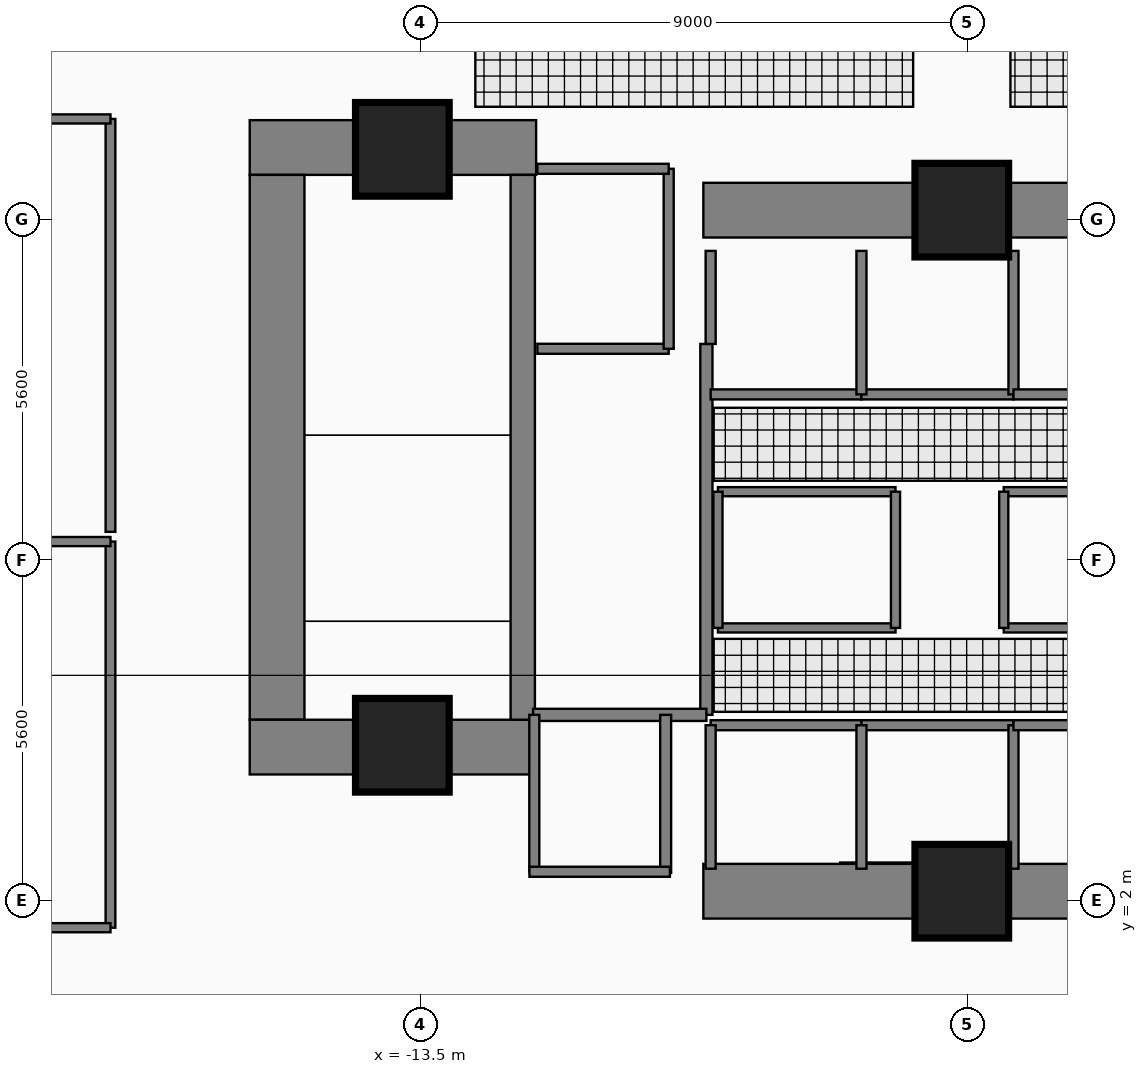
"""IFC4 building model, lengths in metres.
Left out: names, types, materials, properties, quantities, classifications, styles, units other than length and angle.
Written with IfcOpenShell. Run it as: python <this file> out.ifc"""

import sys

from ifc_helpers import new_model, si_unit, direction, frame, frame_2d, origin, origin_2d, place, context, subcontext, project, spatial, rectangle, extrude, element, fill, save


model = new_model("IFC4")
c1 = context("Model", 3, precision=1e-05, world=origin(), true_north=direction((0.0, 1.0)))
c2 = subcontext(c1, "Body", "Model", "MODEL_VIEW")
j1 = project(units=[si_unit("LENGTHUNIT", "METRE"), si_unit("PLANEANGLEUNIT", "RADIAN")], contexts=[c1])
p1 = place(None, origin())
s1 = spatial("IfcSite", under=j1, at=p1, CompositionType="ELEMENT")
p2 = place(p1, origin())
s2 = spatial("IfcBuilding", under=s1, at=p2, CompositionType="ELEMENT")
p3 = place(p2, frame((0.0, 0.0, 27.6)))
s3 = spatial("IfcBuildingStorey", under=s2, at=p3, CompositionType="ELEMENT", Elevation=27.6)
p4 = place(p3, frame((-16.31, 14.38, 0.0), z_axis=(0.0, 0.0, 1.0), x_axis=(1.0, 0.0, 0.0)))
e1 = element("IfcWall", 1, at=p4, inside=s3, PredefinedType="SHEAR", context=c2, shape_type="SweptSolid", body=[
    extrude(rectangle(XDim=4.71, YDim=0.9, at=frame_2d((2.355, 0.0))), origin(), (0.0, 0.0, 1.0), 3.46),
])
p5 = place(p3, frame((-15.86, 4.97, 0.0), z_axis=(0.0, 0.0, 1.0), x_axis=(0.0, 1.0, 0.0)))
e2 = element("IfcWall", 2, at=p5, inside=s3, PredefinedType="SHEAR", context=c2, shape_type="SweptSolid", body=[
    extrude(rectangle(XDim=8.96, YDim=0.9, at=frame_2d((4.48, 0.0))), origin(), (0.0, 0.0, 1.0), 3.46),
])
p6 = place(p3, frame((-16.31, 4.52, 0.0), z_axis=(0.0, 0.0, 1.0), x_axis=(1.0, 0.0, 0.0)))
e3 = element("IfcWall", 3, at=p6, inside=s3, PredefinedType="SHEAR", context=c2, shape_type="SweptSolid", body=[
    extrude(rectangle(XDim=4.71, YDim=0.9, at=frame_2d((2.355, 0.0))), origin(), (0.0, 0.0, 1.0), 3.46),
])
for number, where, z_axis, x_axis in (
    (4, (-8.85, 2.15, 0.0), (0.0, 0.0, 1.0), (1.0, 0.0, 0.0)),
    (5, (-8.85, 13.35, 0.0), (0.0, 0.0, 1.0), (1.0, 0.0, 0.0)),
):
    element("IfcWall", number, at=place(p3, frame(where, z_axis=z_axis, x_axis=x_axis)), inside=s3, PredefinedType="SHEAR", context=c2, shape_type="SweptSolid", body=[
        extrude(rectangle(XDim=7.6, YDim=0.9, at=frame_2d((3.8, 0.0))), origin(), (0.0, 0.0, 1.0), 3.43),
    ])
p7 = place(p3, frame((-11.82, 4.97, 0.0), z_axis=(0.0, 0.0, 1.0), x_axis=(0.0, 1.0, 0.0)))
e6 = element("IfcWall", 6, at=p7, inside=s3, PredefinedType="SHEAR", context=c2, shape_type="SweptSolid", body=[
    extrude(rectangle(XDim=8.96, YDim=0.4, at=frame_2d((4.48, 0.0))), origin(), (0.0, 0.0, 1.0), 3.46),
])
p8 = place(p7, frame((0.31, 0.0, 0.0)))
e7 = element("IfcOpeningElement", 7, at=p8, cuts=e6, PredefinedType="OPENING", context=c2, shape_type="SweptSolid", body=[
    extrude(rectangle(XDim=1.12, YDim=2.22, at=frame_2d((0.56, 1.11))), frame((0.0, 0.21, 0.0), z_axis=(0.0, -1.0, 0.0), x_axis=(1.0, 0.0, 0.0)), (0.0, 0.0, 1.0), 0.42),
])
for number, where, z_axis, x_axis in (
    (8, (-13.8, 14.35, 0.0), (0.0, 0.0, 1.0), (1.0, 0.0, 0.0)),
    (9, (-4.6, 13.35, 0.0), (0.0, 0.0, 1.0), (1.0, 0.0, 0.0)),
    (10, (-13.8, 4.55, 0.0), (0.0, 0.0, 1.0), (1.0, 0.0, 0.0)),
    (11, (-4.6, 2.15, 0.0), (0.0, 0.0, 1.0), (1.0, 0.0, 0.0)),
):
    element("IfcColumn", number, at=place(p3, frame(where, z_axis=z_axis, x_axis=x_axis)), inside=s3, PredefinedType="COLUMN", context=c2, shape_type="SweptSolid", body=[
        extrude(rectangle(XDim=1.5, YDim=1.5, at=origin_2d()), origin(), (0.0, 0.0, 1.0), 3.65),
    ])
p9 = place(p3, frame((-8.8, 5.05, 0.0), z_axis=(0.0, 0.0, 1.0), x_axis=(0.0, 1.0, 0.0)))
e12 = element("IfcWall", 12, at=p9, inside=s3, PredefinedType="PARTITIONING", context=c2, shape_type="SweptSolid", body=[
    extrude(rectangle(XDim=6.1, YDim=0.2, at=frame_2d((3.05, 0.0))), origin(), (0.0, 0.0, 1.0), 3.43),
])
p10 = place(p9, frame((0.25, 0.0, 0.0)))
e13 = element("IfcOpeningElement", 13, at=p10, cuts=e12, PredefinedType="OPENING", context=c2, shape_type="SweptSolid", body=[
    extrude(rectangle(XDim=1.1, YDim=2.2, at=frame_2d((0.55, 1.1))), frame((0.0, 0.11, 0.0), z_axis=(0.0, -1.0, 0.0), x_axis=(1.0, 0.0, 0.0)), (0.0, 0.0, 1.0), 0.22),
])
p11 = place(p9, frame((3.85, 0.0, 0.0)))
e14 = element("IfcOpeningElement", 14, at=p11, cuts=e12, PredefinedType="OPENING", context=c2, shape_type="SweptSolid", body=[
    extrude(rectangle(XDim=1.1, YDim=2.2, at=frame_2d((0.55, 1.1))), frame((0.0, 0.11, 0.0), z_axis=(0.0, -1.0, 0.0), x_axis=(1.0, 0.0, 0.0)), (0.0, 0.0, 1.0), 0.22),
])
p12 = place(p3, frame((-11.58, 11.07, 0.0), z_axis=(0.0, 0.0, 1.0), x_axis=(1.0, 0.0, 0.0)))
e15 = element("IfcWall", 15, at=p12, inside=s3, PredefinedType="PARTITIONING", context=c2, shape_type="SweptSolid", body=[
    extrude(rectangle(XDim=2.16, YDim=0.165, at=frame_2d((1.08, 0.0))), origin(), (0.0, 0.0, 1.0), 3.43),
])
p13 = place(p12, frame((0.53, 0.0, 0.0)))
e16 = element("IfcOpeningElement", 16, at=p13, cuts=e15, PredefinedType="OPENING", context=c2, shape_type="SweptSolid", body=[
    extrude(rectangle(XDim=1.15, YDim=2.25, at=frame_2d((0.575, 1.125))), frame((0.0, 0.093, 0.0), z_axis=(0.0, -1.0, 0.0), x_axis=(1.0, 0.0, 0.0)), (0.0, 0.0, 1.0), 0.185),
])
p14 = place(p3, frame((-8.73, 4.88, 0.0), z_axis=(0.0, 0.0, 1.0), x_axis=(1.0, 0.0, 0.0)))
e17 = element("IfcWall", 17, at=p14, inside=s3, PredefinedType="PARTITIONING", context=c2, shape_type="SweptSolid", body=[
    extrude(rectangle(XDim=2.48, YDim=0.165, at=frame_2d((1.24, 0.0))), origin(), (0.0, 0.0, 1.0), 3.43),
])
p15 = place(p14, frame((0.69, 0.0, 0.0)))
e18 = element("IfcOpeningElement", 18, at=p15, cuts=e17, PredefinedType="OPENING", context=c2, shape_type="SweptSolid", body=[
    extrude(rectangle(XDim=1.1, YDim=2.25, at=frame_2d((0.55, 1.125))), frame((0.0, 0.093, 0.0), z_axis=(0.0, -1.0, 0.0), x_axis=(1.0, 0.0, 0.0)), (0.0, 0.0, 1.0), 0.185),
])
p16 = place(p3, frame((-6.25, 4.88, 0.0), z_axis=(0.0, 0.0, 1.0), x_axis=(1.0, 0.0, 0.0)))
e19 = element("IfcWall", 19, at=p16, inside=s3, PredefinedType="PARTITIONING", context=c2, shape_type="SweptSolid", body=[
    extrude(rectangle(XDim=2.5, YDim=0.165, at=frame_2d((1.25, 0.0))), origin(), (0.0, 0.0, 1.0), 3.43),
])
p17 = place(p16, frame((0.7, 0.0, 0.0)))
e20 = element("IfcOpeningElement", 20, at=p17, cuts=e19, PredefinedType="OPENING", context=c2, shape_type="SweptSolid", body=[
    extrude(rectangle(XDim=1.1, YDim=2.25, at=frame_2d((0.55, 1.125))), frame((0.0, 0.093, 0.0), z_axis=(0.0, -1.0, 0.0), x_axis=(1.0, 0.0, 0.0)), (0.0, 0.0, 1.0), 0.185),
])
p18 = place(p3, frame((-8.73, 10.32, 0.0), z_axis=(0.0, 0.0, 1.0), x_axis=(1.0, 0.0, 0.0)))
e21 = element("IfcWall", 21, at=p18, inside=s3, PredefinedType="PARTITIONING", context=c2, shape_type="SweptSolid", body=[
    extrude(rectangle(XDim=2.48, YDim=0.165, at=frame_2d((1.24, 0.0))), origin(), (0.0, 0.0, 1.0), 3.43),
])
p19 = place(p18, frame((0.69, 0.0, 0.0)))
e22 = element("IfcOpeningElement", 22, at=p19, cuts=e21, PredefinedType="OPENING", context=c2, shape_type="SweptSolid", body=[
    extrude(rectangle(XDim=1.1, YDim=2.25, at=frame_2d((0.55, 1.125))), frame((0.0, 0.093, 0.0), z_axis=(0.0, -1.0, 0.0), x_axis=(1.0, 0.0, 0.0)), (0.0, 0.0, 1.0), 0.185),
])
p20 = place(p3, frame((-6.25, 10.32, 0.0), z_axis=(0.0, 0.0, 1.0), x_axis=(1.0, 0.0, 0.0)))
e23 = element("IfcWall", 23, at=p20, inside=s3, PredefinedType="PARTITIONING", context=c2, shape_type="SweptSolid", body=[
    extrude(rectangle(XDim=2.5, YDim=0.165, at=frame_2d((1.25, 0.0))), origin(), (0.0, 0.0, 1.0), 3.43),
])
p21 = place(p20, frame((0.7, 0.0, 0.0)))
e24 = element("IfcOpeningElement", 24, at=p21, cuts=e23, PredefinedType="OPENING", context=c2, shape_type="SweptSolid", body=[
    extrude(rectangle(XDim=1.1, YDim=2.25, at=frame_2d((0.55, 1.125))), frame((0.0, 0.093, 0.0), z_axis=(0.0, -1.0, 0.0), x_axis=(1.0, 0.0, 0.0)), (0.0, 0.0, 1.0), 0.185),
])
p22 = place(p3, frame((-8.61, 8.72, 0.0), z_axis=(0.0, 0.0, 1.0), x_axis=(1.0, 0.0, 0.0)))
e25 = element("IfcWall", 25, at=p22, inside=s3, PredefinedType="PARTITIONING", context=c2, shape_type="SweptSolid", body=[
    extrude(rectangle(XDim=2.92, YDim=0.15, at=frame_2d((1.46, 0.0))), origin(), (0.0, 0.0, 1.0), 3.43),
])
p23 = place(p22, frame((1.01, 0.0, 0.0)))
e26 = element("IfcOpeningElement", 26, at=p23, cuts=e25, PredefinedType="OPENING", context=c2, shape_type="SweptSolid", body=[
    extrude(rectangle(XDim=0.9, YDim=2.15, at=frame_2d((0.45, 1.075))), frame((0.0, 0.085, 0.0), z_axis=(0.0, -1.0, 0.0), x_axis=(1.0, 0.0, 0.0)), (0.0, 0.0, 1.0), 0.17),
])
p24 = place(p3, frame((-3.91, 6.48, 0.0), z_axis=(0.0, 0.0, 1.0), x_axis=(1.0, 0.0, 0.0)))
e27 = element("IfcWall", 27, at=p24, inside=s3, PredefinedType="PARTITIONING", context=c2, shape_type="SweptSolid", body=[
    extrude(rectangle(XDim=2.59, YDim=0.15, at=frame_2d((1.295, 0.0))), origin(), (0.0, 0.0, 1.0), 3.43),
])
p25 = place(p24, frame((0.845, 0.0, 0.0)))
e28 = element("IfcOpeningElement", 28, at=p25, cuts=e27, PredefinedType="OPENING", context=c2, shape_type="SweptSolid", body=[
    extrude(rectangle(XDim=0.9, YDim=2.15, at=frame_2d((0.45, 1.075))), frame((0.0, 0.085, 0.0), z_axis=(0.0, -1.0, 0.0), x_axis=(1.0, 0.0, 0.0)), (0.0, 0.0, 1.0), 0.17),
])
p26 = place(p3, frame((-18.6, 1.55, 0.0), z_axis=(0.0, 0.0, 1.0), x_axis=(0.0, 1.0, 0.0)))
e29 = element("IfcWall", 29, at=p26, inside=s3, PredefinedType="PARTITIONING", context=c2, shape_type="SweptSolid", body=[
    extrude(rectangle(XDim=6.35, YDim=0.16, at=frame_2d((3.175, 0.0))), origin(), (0.0, 0.0, 1.0), 3.43),
])
p27 = place(p26, frame((2.7, 0.0, 0.0)))
e30 = element("IfcOpeningElement", 30, at=p27, cuts=e29, PredefinedType="OPENING", context=c2, shape_type="SweptSolid", body=[
    extrude(rectangle(XDim=0.95, YDim=2.15, at=frame_2d((0.475, 1.075))), frame((0.0, 0.09, 0.0), z_axis=(0.0, -1.0, 0.0), x_axis=(1.0, 0.0, 0.0)), (0.0, 0.0, 1.0), 0.18),
])
p28 = place(p3, frame((-18.6, 8.06, 0.0), z_axis=(0.0, 0.0, 1.0), x_axis=(0.0, 1.0, 0.0)))
e31 = element("IfcWall", 31, at=p28, inside=s3, PredefinedType="PARTITIONING", context=c2, shape_type="SweptSolid", body=[
    extrude(rectangle(XDim=6.79, YDim=0.16, at=frame_2d((3.395, 0.0))), origin(), (0.0, 0.0, 1.0), 3.43),
])
p29 = place(p28, frame((2.92, 0.0, 0.0)))
e32 = element("IfcOpeningElement", 32, at=p29, cuts=e31, PredefinedType="OPENING", context=c2, shape_type="SweptSolid", body=[
    extrude(rectangle(XDim=0.95, YDim=2.15, at=frame_2d((0.475, 1.075))), frame((0.0, 0.09, 0.0), z_axis=(0.0, -1.0, 0.0), x_axis=(1.0, 0.0, 0.0)), (0.0, 0.0, 1.0), 0.18),
])
p30 = place(p3, frame((-11.65, 5.05, 0.0), z_axis=(0.0, 0.0, 1.0), x_axis=(1.0, 0.0, 0.0)))
e33 = element("IfcWall", 33, at=p30, inside=s3, PredefinedType="PARTITIONING", context=c2, shape_type="SweptSolid", body=[
    extrude(rectangle(XDim=2.85, YDim=0.2, at=frame_2d((1.425, 0.0))), origin(), (0.0, 0.0, 1.0), 3.43),
])
p31 = place(p3, frame((-9.42, 11.07, 0.0), z_axis=(0.0, 0.0, 1.0), x_axis=(0.0, 1.0, 0.0)))
e34 = element("IfcWall", 34, at=p31, inside=s3, PredefinedType="PARTITIONING", context=c2, shape_type="SweptSolid", body=[
    extrude(rectangle(XDim=2.96, YDim=0.165, at=frame_2d((1.48, 0.0))), origin(), (0.0, 0.0, 1.0), 3.43),
])
p32 = place(p3, frame((-11.58, 14.03, 0.0), z_axis=(0.0, 0.0, 1.0), x_axis=(1.0, 0.0, 0.0)))
e35 = element("IfcWall", 35, at=p32, inside=s3, PredefinedType="PARTITIONING", context=c2, shape_type="SweptSolid", body=[
    extrude(rectangle(XDim=2.16, YDim=0.165, at=frame_2d((1.08, 0.0))), origin(), (0.0, 0.0, 1.0), 3.43),
])
for number, where, z_axis, x_axis in (
    (36, (-8.73, 2.52, 0.0), (0.0, 0.0, 1.0), (0.0, 1.0, 0.0)),
    (37, (-6.25, 2.52, 0.0), (0.0, 0.0, 1.0), (0.0, 1.0, 0.0)),
    (38, (-3.75, 2.52, 0.0), (0.0, 0.0, 1.0), (0.0, 1.0, 0.0)),
):
    element("IfcWall", number, at=place(p3, frame(where, z_axis=z_axis, x_axis=x_axis)), inside=s3, PredefinedType="PARTITIONING", context=c2, shape_type="SweptSolid", body=[
        extrude(rectangle(XDim=2.36, YDim=0.165, at=frame_2d((1.18, 0.0))), origin(), (0.0, 0.0, 1.0), 3.43),
    ])
p33 = place(p3, frame((-8.73, 11.15, 0.0), z_axis=(0.0, 0.0, 1.0), x_axis=(0.0, 1.0, 0.0)))
e39 = element("IfcWall", 39, at=p33, inside=s3, PredefinedType="PARTITIONING", context=c2, shape_type="SweptSolid", body=[
    extrude(rectangle(XDim=1.53, YDim=0.165, at=frame_2d((0.765, 0.0))), origin(), (0.0, 0.0, 1.0), 3.43),
])
for number, where, z_axis, x_axis in (
    (40, (-6.25, 10.32, 0.0), (0.0, 0.0, 1.0), (0.0, 1.0, 0.0)),
    (41, (-3.75, 10.32, 0.0), (0.0, 0.0, 1.0), (0.0, 1.0, 0.0)),
):
    element("IfcWall", number, at=place(p3, frame(where, z_axis=z_axis, x_axis=x_axis)), inside=s3, PredefinedType="PARTITIONING", context=c2, shape_type="SweptSolid", body=[
        extrude(rectangle(XDim=2.36, YDim=0.165, at=frame_2d((1.18, 0.0))), origin(), (0.0, 0.0, 1.0), 3.43),
    ])
for number, where, z_axis, x_axis in (
    (42, (-3.75, 4.88, 0.0), (0.0, 0.0, 1.0), (1.0, 0.0, 0.0)),
    (43, (-3.75, 10.32, 0.0), (0.0, 0.0, 1.0), (1.0, 0.0, 0.0)),
):
    element("IfcWall", number, at=place(p3, frame(where, z_axis=z_axis, x_axis=x_axis)), inside=s3, PredefinedType="PARTITIONING", context=c2, shape_type="SweptSolid", body=[
        extrude(rectangle(XDim=2.48, YDim=0.165, at=frame_2d((1.24, 0.0))), origin(), (0.0, 0.0, 1.0), 3.43),
    ])
p34 = place(p3, frame((-9.47, 2.45, 0.0), z_axis=(0.0, 0.0, 1.0), x_axis=(0.0, 1.0, 0.0)))
e44 = element("IfcWall", 44, at=p34, inside=s3, PredefinedType="PARTITIONING", context=c2, shape_type="SweptSolid", body=[
    extrude(rectangle(XDim=2.6, YDim=0.18, at=frame_2d((1.3, 0.0))), origin(), (0.0, 0.0, 1.0), 3.43),
])
p35 = place(p3, frame((-11.63, 2.47, 0.0), z_axis=(0.0, 0.0, 1.0), x_axis=(0.0, 1.0, 0.0)))
e45 = element("IfcWall", 45, at=p35, inside=s3, PredefinedType="PARTITIONING", context=c2, shape_type="SweptSolid", body=[
    extrude(rectangle(XDim=2.58, YDim=0.165, at=frame_2d((1.29, 0.0))), origin(), (0.0, 0.0, 1.0), 3.43),
])
p36 = place(p3, frame((-11.71, 2.47, 0.0), z_axis=(0.0, 0.0, 1.0), x_axis=(1.0, 0.0, 0.0)))
e46 = element("IfcWall", 46, at=p36, inside=s3, PredefinedType="PARTITIONING", context=c2, shape_type="SweptSolid", body=[
    extrude(rectangle(XDim=2.31, YDim=0.165, at=frame_2d((1.155, 0.0))), origin(), (0.0, 0.0, 1.0), 2.03),
])
p37 = place(p3, frame((-8.61, 6.48, 0.0), z_axis=(0.0, 0.0, 1.0), x_axis=(1.0, 0.0, 0.0)))
e47 = element("IfcWall", 47, at=p37, inside=s3, PredefinedType="PARTITIONING", context=c2, shape_type="SweptSolid", body=[
    extrude(rectangle(XDim=2.92, YDim=0.15, at=frame_2d((1.46, 0.0))), origin(), (0.0, 0.0, 1.0), 3.43),
])
for number, where, z_axis, x_axis in (
    (48, (-8.61, 6.48, 0.0), (0.0, 0.0, 1.0), (0.0, 1.0, 0.0)),
    (49, (-5.69, 6.48, 0.0), (0.0, 0.0, 1.0), (0.0, 1.0, 0.0)),
):
    element("IfcWall", number, at=place(p3, frame(where, z_axis=z_axis, x_axis=x_axis)), inside=s3, PredefinedType="PARTITIONING", context=c2, shape_type="SweptSolid", body=[
        extrude(rectangle(XDim=2.24, YDim=0.15, at=frame_2d((1.12, 0.0))), origin(), (0.0, 0.0, 1.0), 3.43),
    ])
p38 = place(p3, frame((-3.91, 8.72, 0.0), z_axis=(0.0, 0.0, 1.0), x_axis=(1.0, 0.0, 0.0)))
e50 = element("IfcWall", 50, at=p38, inside=s3, PredefinedType="PARTITIONING", context=c2, shape_type="SweptSolid", body=[
    extrude(rectangle(XDim=2.59, YDim=0.15, at=frame_2d((1.295, 0.0))), origin(), (0.0, 0.0, 1.0), 3.43),
])
p39 = place(p3, frame((-3.91, 6.48, 0.0), z_axis=(0.0, 0.0, 1.0), x_axis=(0.0, 1.0, 0.0)))
e51 = element("IfcWall", 51, at=p39, inside=s3, PredefinedType="PARTITIONING", context=c2, shape_type="SweptSolid", body=[
    extrude(rectangle(XDim=2.24, YDim=0.15, at=frame_2d((1.12, 0.0))), origin(), (0.0, 0.0, 1.0), 3.43),
])
p40 = place(p3, frame((-27.605, 1.55, 0.0), z_axis=(0.0, 0.0, 1.0), x_axis=(1.0, 0.0, 0.0)))
e52 = element("IfcWall", 52, at=p40, inside=s3, PredefinedType="PARTITIONING", context=c2, shape_type="SweptSolid", body=[
    extrude(rectangle(XDim=9.005, YDim=0.15, at=frame_2d((4.503, 0.0))), origin(), (0.0, 0.0, 1.0), 3.43),
])
for number, where, z_axis, x_axis in (
    (53, (-25.64, 7.9, 0.0), (0.0, 0.0, 1.0), (1.0, 0.0, 0.0)),
    (54, (-25.64, 14.85, 0.0), (0.0, 0.0, 1.0), (1.0, 0.0, 0.0)),
):
    element("IfcWall", number, at=place(p3, frame(where, z_axis=z_axis, x_axis=x_axis)), inside=s3, PredefinedType="PARTITIONING", context=c2, shape_type="SweptSolid", body=[
        extrude(rectangle(XDim=7.04, YDim=0.15, at=frame_2d((3.52, 0.0))), origin(), (0.0, 0.0, 1.0), 3.43),
    ])
p41 = place(p8, origin())
e55 = element("IfcDoor", 55, at=p41, inside=s3, OperationType="SINGLE_SWING_LEFT", PredefinedType="DOOR", context=c2, shape_type="SweptSolid", body=[
    extrude(rectangle(XDim=1.12, YDim=2.22, at=frame_2d((0.56, 1.11))), frame((0.0, 0.025, 0.0), z_axis=(0.0, -1.0, 0.0), x_axis=(1.0, 0.0, 0.0)), (0.0, 0.0, 1.0), 0.05),
])
fill(e7, e55)
p42 = place(p10, origin())
e56 = element("IfcDoor", 56, at=p42, inside=s3, OperationType="SINGLE_SWING_LEFT", PredefinedType="DOOR", context=c2, shape_type="SweptSolid", body=[
    extrude(rectangle(XDim=1.1, YDim=2.2, at=frame_2d((0.55, 1.1))), frame((0.0, 0.025, 0.0), z_axis=(0.0, -1.0, 0.0), x_axis=(1.0, 0.0, 0.0)), (0.0, 0.0, 1.0), 0.05),
])
fill(e13, e56)
p43 = place(p11, origin())
e57 = element("IfcDoor", 57, at=p43, inside=s3, OperationType="SINGLE_SWING_RIGHT", PredefinedType="DOOR", context=c2, shape_type="SweptSolid", body=[
    extrude(rectangle(XDim=1.1, YDim=2.2, at=frame_2d((0.55, 1.1))), frame((0.0, 0.025, 0.0), z_axis=(0.0, -1.0, 0.0), x_axis=(1.0, 0.0, 0.0)), (0.0, 0.0, 1.0), 0.05),
])
fill(e14, e57)
p44 = place(p13, origin())
e58 = element("IfcDoor", 58, at=p44, inside=s3, OperationType="SLIDING_TO_LEFT", PredefinedType="DOOR", context=c2, shape_type="SweptSolid", body=[
    extrude(rectangle(XDim=1.15, YDim=2.25, at=frame_2d((0.575, 1.125))), frame((0.0, 0.025, 0.0), z_axis=(0.0, -1.0, 0.0), x_axis=(1.0, 0.0, 0.0)), (0.0, 0.0, 1.0), 0.05),
])
fill(e16, e58)
p45 = place(p15, origin())
e59 = element("IfcDoor", 59, at=p45, inside=s3, OperationType="SLIDING_TO_LEFT", PredefinedType="DOOR", context=c2, shape_type="SweptSolid", body=[
    extrude(rectangle(XDim=1.1, YDim=2.25, at=frame_2d((0.55, 1.125))), frame((0.0, 0.025, 0.0), z_axis=(0.0, -1.0, 0.0), x_axis=(1.0, 0.0, 0.0)), (0.0, 0.0, 1.0), 0.05),
])
fill(e18, e59)
p46 = place(p17, origin())
e60 = element("IfcDoor", 60, at=p46, inside=s3, OperationType="SLIDING_TO_LEFT", PredefinedType="DOOR", context=c2, shape_type="SweptSolid", body=[
    extrude(rectangle(XDim=1.1, YDim=2.25, at=frame_2d((0.55, 1.125))), frame((0.0, 0.025, 0.0), z_axis=(0.0, -1.0, 0.0), x_axis=(1.0, 0.0, 0.0)), (0.0, 0.0, 1.0), 0.05),
])
fill(e20, e60)
p47 = place(p19, origin())
e61 = element("IfcDoor", 61, at=p47, inside=s3, OperationType="SLIDING_TO_LEFT", PredefinedType="DOOR", context=c2, shape_type="SweptSolid", body=[
    extrude(rectangle(XDim=1.1, YDim=2.25, at=frame_2d((0.55, 1.125))), frame((0.0, 0.025, 0.0), z_axis=(0.0, -1.0, 0.0), x_axis=(1.0, 0.0, 0.0)), (0.0, 0.0, 1.0), 0.05),
])
fill(e22, e61)
p48 = place(p21, origin())
e62 = element("IfcDoor", 62, at=p48, inside=s3, OperationType="SLIDING_TO_LEFT", PredefinedType="DOOR", context=c2, shape_type="SweptSolid", body=[
    extrude(rectangle(XDim=1.1, YDim=2.25, at=frame_2d((0.55, 1.125))), frame((0.0, 0.025, 0.0), z_axis=(0.0, -1.0, 0.0), x_axis=(1.0, 0.0, 0.0)), (0.0, 0.0, 1.0), 0.05),
])
fill(e24, e62)
p49 = place(p23, origin())
e63 = element("IfcDoor", 63, at=p49, inside=s3, OperationType="SINGLE_SWING_LEFT", PredefinedType="DOOR", context=c2, shape_type="SweptSolid", body=[
    extrude(rectangle(XDim=0.9, YDim=2.15, at=frame_2d((0.45, 1.075))), frame((0.0, 0.025, 0.0), z_axis=(0.0, -1.0, 0.0), x_axis=(1.0, 0.0, 0.0)), (0.0, 0.0, 1.0), 0.05),
])
fill(e26, e63)
p50 = place(p25, origin())
e64 = element("IfcDoor", 64, at=p50, inside=s3, OperationType="SINGLE_SWING_RIGHT", PredefinedType="DOOR", context=c2, shape_type="SweptSolid", body=[
    extrude(rectangle(XDim=0.9, YDim=2.15, at=frame_2d((0.45, 1.075))), frame((0.0, 0.025, 0.0), z_axis=(0.0, -1.0, 0.0), x_axis=(1.0, 0.0, 0.0)), (0.0, 0.0, 1.0), 0.05),
])
fill(e28, e64)
p51 = place(p27, origin())
e65 = element("IfcDoor", 65, at=p51, inside=s3, OperationType="SINGLE_SWING_RIGHT", PredefinedType="DOOR", context=c2, shape_type="SweptSolid", body=[
    extrude(rectangle(XDim=0.95, YDim=2.15, at=frame_2d((0.475, 1.075))), frame((0.0, 0.025, 0.0), z_axis=(0.0, -1.0, 0.0), x_axis=(1.0, 0.0, 0.0)), (0.0, 0.0, 1.0), 0.05),
])
fill(e30, e65)
p52 = place(p29, origin())
e66 = element("IfcDoor", 66, at=p52, inside=s3, OperationType="SINGLE_SWING_LEFT", PredefinedType="DOOR", context=c2, shape_type="SweptSolid", body=[
    extrude(rectangle(XDim=0.95, YDim=2.15, at=frame_2d((0.475, 1.075))), frame((0.0, 0.025, 0.0), z_axis=(0.0, -1.0, 0.0), x_axis=(1.0, 0.0, 0.0)), (0.0, 0.0, 1.0), 0.05),
])
fill(e32, e66)
save(model, sys.argv[1])
